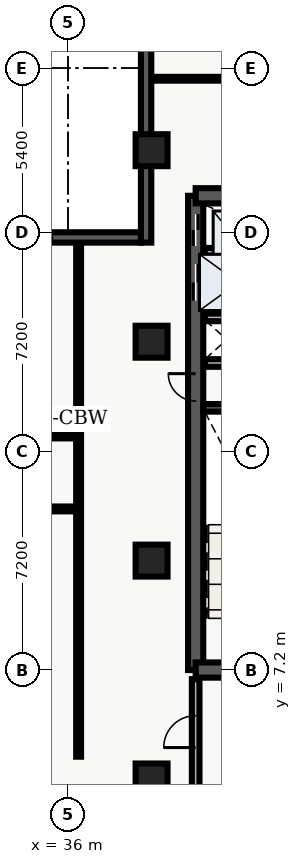
"""IFC4 building model, lengths in metres.
Left out: names, types, materials, properties, quantities, classifications, styles, units other than length and angle.
Written with IfcOpenShell. Run it as: python <this file> out.ifc"""

import sys

from ifc_helpers import new_model, entity, si_unit, converted_unit, direction, frame, origin_with_axes, origin_2d_with_axis, place, context, subcontext, project, spatial, polyline, rectangle, outline, extrude, element, fill, save


model = new_model("IFC4")
c1 = context("Model", 3, precision=1e-05, world=origin_with_axes(), true_north=direction((0.0, 1.0)))
c2 = subcontext(c1, "Body", "Model", "MODEL_VIEW")
j1 = project(units=[si_unit("LENGTHUNIT", "METRE"), converted_unit("PLANEANGLEUNIT", "DEGREE", entity("IfcPlaneAngleMeasure", 0.017), si_unit("PLANEANGLEUNIT", "RADIAN"), dimensions=[0, 0, 0, 0, 0, 0, 0])], contexts=[c1])
p1 = place(None, origin_with_axes())
s1 = spatial("IfcSite", under=j1, at=p1, CompositionType="ELEMENT")
p2 = place(p1, origin_with_axes())
s2 = spatial("IfcBuilding", under=s1, at=p2, CompositionType="ELEMENT")
p3 = place(p2, frame((0.0, 0.0, 183.6), z_axis=(0.0, 0.0, 1.0), x_axis=(1.0, 0.0, 0.0)))
s3 = spatial("IfcBuildingStorey", under=s2, at=p3, CompositionType="ELEMENT", Elevation=183.6)
p4 = place(p3, frame((40.2, 7.2, 0.0), z_axis=(0.0, 0.0, 1.0), x_axis=(0.0, 1.0, 0.0)))
e1 = element("IfcWall", 1, at=p4, inside=s3, PredefinedType="SHEAR", context=c2, shape_type="SweptSolid", body=[
    extrude(outline(polyline([(0.0, -0.25), (15.6, -0.25), (15.6, 0.25), (0.0, 0.25), (0.0, -0.25)])), origin_with_axes(), (0.0, 0.0, 1.0), 3.6),
])
p5 = place(p4, frame((14.475, 0.0, 0.0), z_axis=(0.0, 0.0, 1.0), x_axis=(1.0, 0.0, 0.0)))
e2 = element("IfcOpeningElement", 2, at=p5, cuts=e1, PredefinedType="OPENING", context=c2, shape_type="SweptSolid", body=[
    extrude(rectangle(XDim=1.05, YDim=0.52, at=origin_2d_with_axis()), origin_with_axes(), (0.0, 0.0, 1.0), 2.15),
])
p6 = place(p4, frame((12.75, 0.0, 0.0), z_axis=(0.0, 0.0, 1.0), x_axis=(1.0, 0.0, 0.0)))
e3 = element("IfcOpeningElement", 3, at=p6, cuts=e1, PredefinedType="OPENING", context=c2, shape_type="SweptSolid", body=[
    extrude(rectangle(XDim=1.2, YDim=0.52, at=origin_2d_with_axis()), origin_with_axes(), (0.0, 0.0, 1.0), 2.15),
])
p7 = place(p4, frame((9.3, 0.0, 0.0), z_axis=(0.0, 0.0, 1.0), x_axis=(1.0, 0.0, 0.0)))
e4 = element("IfcOpeningElement", 4, at=p7, cuts=e1, PredefinedType="OPENING", context=c2, shape_type="SweptSolid", body=[
    extrude(rectangle(XDim=0.9, YDim=0.52, at=origin_2d_with_axis()), origin_with_axes(), (0.0, 0.0, 1.0), 2.15),
])
p8 = place(p3, frame((40.2, 7.2, 0.0), z_axis=(0.0, 0.0, 1.0), x_axis=(1.0, 0.0, 0.0)))
e5 = element("IfcWall", 5, at=p8, inside=s3, PredefinedType="SHEAR", context=c2, shape_type="SweptSolid", body=[
    extrude(outline(polyline([(0.0, -0.25), (7.85, -0.25), (7.85, 0.25), (0.0, 0.25), (0.0, -0.25)])), origin_with_axes(), (0.0, 0.0, 1.0), 3.6),
])
p9 = place(p8, frame((2.175, 0.0, 0.0), z_axis=(0.0, 0.0, 1.0), x_axis=(1.0, 0.0, 0.0)))
e6 = element("IfcOpeningElement", 6, at=p9, cuts=e5, PredefinedType="OPENING", context=c2, shape_type="SweptSolid", body=[
    extrude(rectangle(XDim=1.05, YDim=0.52, at=origin_2d_with_axis()), origin_with_axes(), (0.0, 0.0, 1.0), 2.15),
])
p10 = place(p3, frame((40.2, 22.8, 0.0), z_axis=(0.0, 0.0, 1.0), x_axis=(1.0, 0.0, 0.0)))
e7 = element("IfcWall", 7, at=p10, inside=s3, PredefinedType="SHEAR", context=c2, shape_type="SweptSolid", body=[
    extrude(outline(polyline([(0.0, -0.25), (7.85, -0.25), (7.85, 0.25), (0.0, 0.25), (0.0, -0.25)])), origin_with_axes(), (0.0, 0.0, 1.0), 3.6),
])
p11 = place(p10, frame((5.775, 0.0, 0.0), z_axis=(0.0, 0.0, 1.0), x_axis=(1.0, 0.0, 0.0)))
e8 = element("IfcOpeningElement", 8, at=p11, cuts=e7, PredefinedType="OPENING", context=c2, shape_type="SweptSolid", body=[
    extrude(rectangle(XDim=1.05, YDim=0.52, at=origin_2d_with_axis()), origin_with_axes(), (0.0, 0.0, 1.0), 2.15),
])
p12 = place(p3, frame((40.45, 15.825, 0.0), z_axis=(0.0, 0.0, 1.0), x_axis=(1.0, 0.0, 0.0)))
e9 = element("IfcWall", 9, at=p12, inside=s3, PredefinedType="SHEAR", context=c2, shape_type="SweptSolid", body=[
    extrude(outline(polyline([(0.0, -0.125), (3.55, -0.125), (3.55, 0.125), (0.0, 0.125), (0.0, -0.125)])), origin_with_axes(), (0.0, 0.0, 1.0), 3.6),
])
p13 = place(p3, frame((40.5, 17.3, 0.0), z_axis=(0.0, 0.0, 1.0), x_axis=(1.0, 0.0, 0.0)))
e10 = element("IfcWall", 10, at=p13, inside=s3, PredefinedType="SOLIDWALL", context=c2, shape_type="SweptSolid", body=[
    extrude(outline(polyline([(0.0, -0.125), (3.5, -0.125), (3.5, 0.125), (0.0, 0.125), (0.0, -0.125)])), origin_with_axes(), (0.0, 0.0, 1.0), 2.64),
])
p14 = place(p13, frame((2.4, 0.0, 0.0), z_axis=(0.0, 0.0, 1.0), x_axis=(1.0, 0.0, 0.0)))
e11 = element("IfcOpeningElement", 11, at=p14, cuts=e10, PredefinedType="OPENING", context=c2, shape_type="SweptSolid", body=[
    extrude(rectangle(XDim=0.9, YDim=0.27, at=origin_2d_with_axis()), origin_with_axes(), (0.0, 0.0, 1.0), 2.15),
])
p15 = place(p3, frame((40.5, 18.8, 0.0), z_axis=(0.0, 0.0, 1.0), x_axis=(1.0, 0.0, 0.0)))
e12 = element("IfcWall", 12, at=p15, inside=s3, PredefinedType="SOLIDWALL", context=c2, shape_type="SweptSolid", body=[
    extrude(outline(polyline([(0.0, -0.125), (3.5, -0.125), (3.5, 0.125), (0.0, 0.125), (0.0, -0.125)])), origin_with_axes(), (0.0, 0.0, 1.0), 2.64),
])
p16 = place(p3, frame((40.2, 3.1, 0.0), z_axis=(0.0, 0.0, 1.0), x_axis=(0.0, 1.0, 0.0)))
e13 = element("IfcWall", 13, at=p16, inside=s3, PredefinedType="SOLIDWALL", context=c2, shape_type="SweptSolid", body=[
    extrude(outline(polyline([(0.0, -0.125), (3.8, -0.125), (3.8, 0.125), (0.0, 0.125), (0.0, -0.125)])), origin_with_axes(), (0.0, 0.0, 1.0), 2.64),
])
p17 = place(p16, frame((2.075, 0.0, 0.0), z_axis=(0.0, 0.0, 1.0), x_axis=(1.0, 0.0, 0.0)))
e14 = element("IfcOpeningElement", 14, at=p17, cuts=e13, PredefinedType="OPENING", context=c2, shape_type="SweptSolid", body=[
    extrude(rectangle(XDim=1.05, YDim=0.27, at=origin_2d_with_axis()), origin_with_axes(), (0.0, 0.0, 1.0), 2.15),
])
for number, where, z_axis, x_axis in (
    (15, (38.75, 3.6, 0.0), (0.0, 0.0, 1.0), (1.0, 0.0, 0.0)),
    (16, (38.75, 10.8, 0.0), (0.0, 0.0, 1.0), (1.0, 0.0, 0.0)),
    (17, (38.75, 18.0, 0.0), (0.0, 0.0, 1.0), (1.0, 0.0, 0.0)),
    (18, (38.75, 24.3, 0.0), (0.0, 0.0, 1.0), (1.0, 0.0, 0.0)),
):
    element("IfcColumn", number, at=place(p3, frame(where, z_axis=z_axis, x_axis=x_axis)), inside=s3, PredefinedType="COLUMN", context=c2, shape_type="SweptSolid", body=[
        extrude(rectangle(XDim=1.05, YDim=1.05, at=origin_2d_with_axis()), origin_with_axes(), (0.0, 0.0, 1.0), 3.9),
    ])
p18 = place(p3, frame((40.5, 20.96, 0.0), z_axis=(0.0, 0.0, 1.0), x_axis=(1.0, 0.0, 0.0)))
e19 = element("IfcWall", 19, at=p18, inside=s3, PredefinedType="SOLIDWALL", context=c2, shape_type="SweptSolid", body=[
    extrude(outline(polyline([(0.0, -0.125), (3.5, -0.125), (3.5, 0.125), (0.0, 0.125), (0.0, -0.125)])), origin_with_axes(), (0.0, 0.0, 1.0), 2.64),
])
p19 = place(p3, frame((21.15, 12.5, 0.0), z_axis=(0.0, 0.0, 1.0), x_axis=(1.0, 0.0, 0.0)))
e20 = element("IfcWall", 20, at=p19, inside=s3, PredefinedType="PARTITIONING", context=c2, shape_type="SweptSolid", body=[
    extrude(outline(polyline([(0.0, -0.08), (15.2, -0.08), (15.2, 0.08), (0.0, 0.08), (0.0, -0.08)])), origin_with_axes(), (0.0, 0.0, 1.0), 2.64),
])
p20 = place(p19, frame((1.951, 0.0, 0.0), z_axis=(0.0, 0.0, 1.0), x_axis=(1.0, 0.0, 0.0)))
e21 = element("IfcOpeningElement", 21, at=p20, cuts=e20, PredefinedType="OPENING", context=c2, shape_type="SweptSolid", body=[
    extrude(rectangle(XDim=1.0, YDim=0.18, at=origin_2d_with_axis()), origin_with_axes(), (0.0, 0.0, 1.0), 2.15),
])
p21 = place(p19, frame((5.086, 0.0, 0.0), z_axis=(0.0, 0.0, 1.0), x_axis=(1.0, 0.0, 0.0)))
e22 = element("IfcOpeningElement", 22, at=p21, cuts=e20, PredefinedType="OPENING", context=c2, shape_type="SweptSolid", body=[
    extrude(rectangle(XDim=1.0, YDim=0.18, at=origin_2d_with_axis()), origin_with_axes(), (0.0, 0.0, 1.0), 2.15),
])
p22 = place(p19, frame((9.28, 0.0, 0.0), z_axis=(0.0, 0.0, 1.0), x_axis=(1.0, 0.0, 0.0)))
e23 = element("IfcOpeningElement", 23, at=p22, cuts=e20, PredefinedType="OPENING", context=c2, shape_type="SweptSolid", body=[
    extrude(rectangle(XDim=1.2, YDim=0.18, at=origin_2d_with_axis()), origin_with_axes(), (0.0, 0.0, 1.0), 2.2),
])
p23 = place(p19, frame((13.055, 0.0, 0.0), z_axis=(0.0, 0.0, 1.0), x_axis=(1.0, 0.0, 0.0)))
e24 = element("IfcOpeningElement", 24, at=p23, cuts=e20, PredefinedType="OPENING", context=c2, shape_type="SweptSolid", body=[
    extrude(rectangle(XDim=1.0, YDim=0.18, at=origin_2d_with_axis()), origin_with_axes(), (0.0, 0.0, 1.0), 2.15),
])
p24 = place(p3, frame((21.15, 14.9, 0.0), z_axis=(0.0, 0.0, 1.0), x_axis=(1.0, 0.0, 0.0)))
e25 = element("IfcWall", 25, at=p24, inside=s3, PredefinedType="PARTITIONING", context=c2, shape_type="SweptSolid", body=[
    extrude(outline(polyline([(0.0, -0.08), (15.2, -0.08), (15.2, 0.08), (0.0, 0.08), (0.0, -0.08)])), origin_with_axes(), (0.0, 0.0, 1.0), 2.64),
])
p25 = place(p24, frame((7.65, 0.0, 0.0), z_axis=(0.0, 0.0, 1.0), x_axis=(1.0, 0.0, 0.0)))
e26 = element("IfcOpeningElement", 26, at=p25, cuts=e25, PredefinedType="OPENING", context=c2, shape_type="SweptSolid", body=[
    extrude(rectangle(XDim=1.0, YDim=0.18, at=origin_2d_with_axis()), origin_with_axes(), (0.0, 0.0, 1.0), 2.15),
])
p26 = place(p3, frame((36.35, 4.35, 0.0), z_axis=(0.0, 0.0, 1.0), x_axis=(0.0, 1.0, 0.0)))
e27 = element("IfcWall", 27, at=p26, inside=s3, PredefinedType="PARTITIONING", context=c2, shape_type="SweptSolid", body=[
    extrude(outline(polyline([(0.0, -0.08), (16.95, -0.08), (16.95, 0.08), (0.0, 0.08), (0.0, -0.08)])), origin_with_axes(), (0.0, 0.0, 1.0), 2.64),
])
p27 = place(p3, frame((38.735, 26.65, 0.0), z_axis=(0.0, 0.0, 1.0), x_axis=(1.0, 0.0, 0.0)))
e28 = element("IfcWall", 28, at=p27, inside=s3, PredefinedType="PARTITIONING", context=c2, shape_type="SweptSolid", body=[
    extrude(outline(polyline([(0.0, -0.062), (20.905, -0.062), (20.905, 0.062), (0.0, 0.062), (0.0, -0.062)])), origin_with_axes(), (0.0, 0.0, 1.0), 2.64),
])
p28 = place(p27, frame((4.265, 0.0, 0.0), z_axis=(0.0, 0.0, 1.0), x_axis=(1.0, 0.0, 0.0)))
e29 = element("IfcOpeningElement", 29, at=p28, cuts=e28, PredefinedType="OPENING", context=c2, shape_type="SweptSolid", body=[
    extrude(rectangle(XDim=1.0, YDim=0.145, at=origin_2d_with_axis()), origin_with_axes(), (0.0, 0.0, 1.0), 2.15),
])
p29 = place(p3, frame((38.57, 21.26, 0.0), z_axis=(0.0, 0.0, 1.0), x_axis=(0.0, 1.0, 0.0)))
e30 = element("IfcWall", 30, at=p29, inside=s3, PredefinedType="SOLIDWALL", context=c2, shape_type="SweptSolid", body=[
    extrude(outline(polyline([(0.0, -0.17), (7.54, -0.17), (7.54, 0.17), (0.0, 0.17), (0.0, -0.17)])), origin_with_axes(), (0.0, 0.0, 1.0), 3.6),
])
p30 = place(p3, frame((26.054, 21.43, 0.0), z_axis=(0.0, 0.0, 1.0), x_axis=(1.0, 0.0, 0.0)))
e31 = element("IfcWall", 31, at=p30, inside=s3, PredefinedType="SOLIDWALL", context=c2, shape_type="SweptSolid", body=[
    extrude(outline(polyline([(0.0, -0.17), (12.346, -0.17), (12.346, 0.17), (0.0, 0.17), (0.0, -0.17)])), origin_with_axes(), (0.0, 0.0, 1.0), 3.6),
])
p31 = place(p30, frame((3.387, 0.0, 0.45), z_axis=(0.0, 0.0, 1.0), x_axis=(1.0, 0.0, 0.0)))
e32 = element("IfcOpeningElement", 32, at=p31, cuts=e31, PredefinedType="OPENING", context=c2, shape_type="SweptSolid", body=[
    extrude(rectangle(XDim=1.8, YDim=0.36, at=origin_2d_with_axis()), origin_with_axes(), (0.0, 0.0, 1.0), 2.1),
])
p32 = place(p30, frame((8.509, 0.0, 0.45), z_axis=(0.0, 0.0, 1.0), x_axis=(1.0, 0.0, 0.0)))
e33 = element("IfcOpeningElement", 33, at=p32, cuts=e31, PredefinedType="OPENING", context=c2, shape_type="SweptSolid", body=[
    extrude(rectangle(XDim=1.8, YDim=0.36, at=origin_2d_with_axis()), origin_with_axes(), (0.0, 0.0, 1.0), 2.1),
])
p33 = place(p4, frame((14.475, 0.0, 0.0), z_axis=(0.0, 0.0, 1.0), x_axis=(1.0, 0.0, 0.0)))
e34 = element("IfcDoor", 34, at=p33, inside=s3, OperationType="SLIDING_TO_RIGHT", PredefinedType="DOOR", context=c2, shape_type="SweptSolid", body=[
    extrude(rectangle(XDim=1.05, YDim=0.09, at=origin_2d_with_axis()), origin_with_axes(), (0.0, 0.0, 1.0), 2.15),
])
fill(e2, e34)
p34 = place(p4, frame((12.75, 0.0, 0.0), z_axis=(0.0, 0.0, 1.0), x_axis=(1.0, 0.0, 0.0)))
e35 = element("IfcDoor", 35, at=p34, inside=s3, OperationType="DOUBLE_DOOR_SLIDING", PredefinedType="DOOR", context=c2, shape_type="SweptSolid", body=[
    extrude(rectangle(XDim=1.2, YDim=0.09, at=origin_2d_with_axis()), origin_with_axes(), (0.0, 0.0, 1.0), 2.15),
])
fill(e3, e35)
p35 = place(p4, frame((9.3, 0.0, 0.0), z_axis=(0.0, 0.0, 1.0), x_axis=(1.0, 0.0, 0.0)))
e36 = element("IfcDoor", 36, at=p35, inside=s3, OperationType="SINGLE_SWING_RIGHT", PredefinedType="DOOR", context=c2, shape_type="SweptSolid", body=[
    extrude(rectangle(XDim=0.9, YDim=0.09, at=origin_2d_with_axis()), origin_with_axes(), (0.0, 0.0, 1.0), 2.15),
])
fill(e4, e36)
p36 = place(p16, frame((2.075, 0.0, 0.0), z_axis=(0.0, 0.0, 1.0), x_axis=(1.0, 0.0, 0.0)))
e37 = element("IfcDoor", 37, at=p36, inside=s3, OperationType="SINGLE_SWING_LEFT", PredefinedType="DOOR", context=c2, shape_type="SweptSolid", body=[
    extrude(rectangle(XDim=1.05, YDim=0.09, at=origin_2d_with_axis()), origin_with_axes(), (0.0, 0.0, 1.0), 2.15),
])
fill(e14, e37)
save(model, sys.argv[1])
